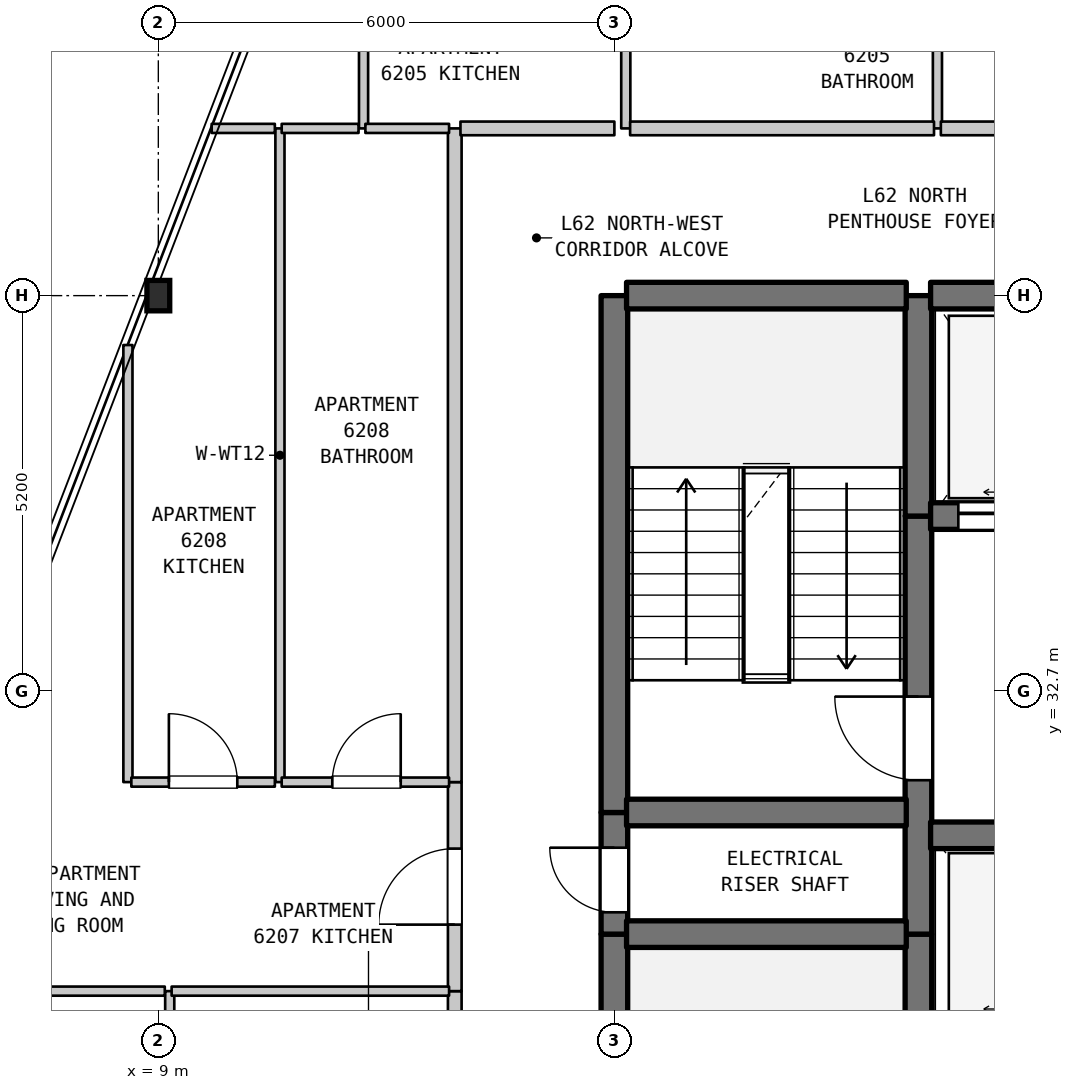
"""IFC4 building model, lengths in metres.
Left out: names, types, materials, properties, quantities, classifications, styles, units other than length and angle.
Written with IfcOpenShell. Run it as: python <this file> out.ifc"""

import sys

from ifc_helpers import new_model, si_unit, direction, frame, frame_2d, origin, origin_2d, place, context, subcontext, project, spatial, rectangle, i_section, extrude, element, fill, save


model = new_model("IFC4")
c1 = context("Model", 3, precision=1e-05, world=origin(), true_north=direction((0.0, 1.0)))
c2 = subcontext(c1, "Body", "Model", "MODEL_VIEW")
j1 = project(units=[si_unit("LENGTHUNIT", "METRE"), si_unit("PLANEANGLEUNIT", "RADIAN")], contexts=[c1])
p1 = place(None, origin())
s1 = spatial("IfcSite", under=j1, at=p1, CompositionType="ELEMENT")
p2 = place(p1, origin())
s2 = spatial("IfcBuilding", under=s1, at=p2, CompositionType="ELEMENT")
p3 = place(p2, frame((0.0, 0.0, 251.0)))
s3 = spatial("IfcBuildingStorey", under=s2, at=p3, CompositionType="ELEMENT", Elevation=251.0)
p4 = place(p3, frame((9.0, 37.9, 0.0), z_axis=(0.0, 0.0, 1.0), x_axis=(1.0, 0.0, 0.0)))
e1 = element("IfcColumn", 1, at=p4, inside=s3, PredefinedType="COLUMN", context=c2, shape_type="SweptSolid", body=[
    extrude(i_section(OverallWidth=0.3, OverallDepth=0.4, WebThickness=0.013, FlangeThickness=0.024, FilletRadius=0.027, at=origin_2d()), origin(), (0.0, 0.0, 1.0), 3.7),
])
p5 = place(p3, frame((8.6, 31.5, 0.0), z_axis=(0.0, 0.0, 1.0), x_axis=(0.0, 1.0, 0.0)))
e2 = element("IfcWall", 2, at=p5, inside=s3, PredefinedType="PARTITIONING", context=c2, shape_type="SweptSolid", body=[
    extrude(rectangle(XDim=5.75, YDim=0.12, at=frame_2d((2.875, 0.0))), origin(), (0.0, 0.0, 1.0), 3.39),
])
p6 = place(p3, frame((9.15, 28.4, 0.0), z_axis=(0.0, 0.0, 1.0), x_axis=(0.0, 1.0, 0.0)))
e3 = element("IfcWall", 3, at=p6, inside=s3, PredefinedType="PARTITIONING", context=c2, shape_type="SweptSolid", body=[
    extrude(rectangle(XDim=0.35, YDim=0.12, at=frame_2d((0.175, 0.0))), origin(), (0.0, 0.0, 1.0), 3.39),
])
p7 = place(p3, frame((10.6, 31.5, 0.0), z_axis=(0.0, 0.0, 1.0), x_axis=(0.0, 1.0, 0.0)))
e4 = element("IfcWall", 4, at=p7, inside=s3, PredefinedType="PARTITIONING", context=c2, shape_type="SweptSolid", body=[
    extrude(rectangle(XDim=8.6, YDim=0.12, at=frame_2d((4.3, 0.0))), origin(), (0.0, 0.0, 1.0), 3.39),
])
p8 = place(p3, frame((11.7, 40.1, 0.0), z_axis=(0.0, 0.0, 1.0), x_axis=(0.0, 1.0, 0.0)))
e5 = element("IfcWall", 5, at=p8, inside=s3, PredefinedType="PARTITIONING", context=c2, shape_type="SweptSolid", body=[
    extrude(rectangle(XDim=2.3, YDim=0.12, at=frame_2d((1.15, 0.0))), origin(), (0.0, 0.0, 1.0), 3.39),
])
p9 = place(p3, frame((12.9, 28.4, 0.0), z_axis=(0.0, 0.0, 1.0), x_axis=(0.0, 1.0, 0.0)))
e6 = element("IfcWall", 6, at=p9, inside=s3, PredefinedType="STANDARD", context=c2, shape_type="SweptSolid", body=[
    extrude(rectangle(XDim=0.35, YDim=0.18, at=frame_2d((0.175, 0.0))), origin(), (0.0, 0.0, 1.0), 3.39),
])
p10 = place(p3, frame((12.9, 28.75, 0.0), z_axis=(0.0, 0.0, 1.0), x_axis=(0.0, 1.0, 0.0)))
e7 = element("IfcWall", 7, at=p10, inside=s3, PredefinedType="STANDARD", context=c2, shape_type="SweptSolid", body=[
    extrude(rectangle(XDim=2.75, YDim=0.18, at=frame_2d((1.375, 0.0))), origin(), (0.0, 0.0, 1.0), 3.39),
])
p11 = place(p10, frame((0.875, 0.0, 0.0)))
e8 = element("IfcOpeningElement", 8, at=p11, cuts=e7, PredefinedType="OPENING", context=c2, shape_type="SweptSolid", body=[
    extrude(rectangle(XDim=1.0, YDim=2.15, at=frame_2d((0.5, 1.075))), frame((0.0, 0.1, 0.0), z_axis=(0.0, -1.0, 0.0), x_axis=(1.0, 0.0, 0.0)), (0.0, 0.0, 1.0), 0.2),
])
p12 = place(p3, frame((12.9, 31.5, 0.0), z_axis=(0.0, 0.0, 1.0), x_axis=(0.0, 1.0, 0.0)))
e9 = element("IfcWall", 9, at=p12, inside=s3, PredefinedType="STANDARD", context=c2, shape_type="SweptSolid", body=[
    extrude(rectangle(XDim=8.6, YDim=0.18, at=frame_2d((4.3, 0.0))), origin(), (0.0, 0.0, 1.0), 3.39),
])
p13 = place(p3, frame((15.0, 22.7, 0.0), z_axis=(0.0, 0.0, 1.0), x_axis=(0.0, 1.0, 0.0)))
e10 = element("IfcWall", 10, at=p13, inside=s3, PredefinedType="SHEAR", context=c2, shape_type="SweptSolid", body=[
    extrude(rectangle(XDim=6.8, YDim=0.35, at=frame_2d((3.4, 0.0))), origin(), (0.0, 0.0, 1.0), 3.39),
])
p14 = place(p3, frame((15.0, 29.5, 0.0), z_axis=(0.0, 0.0, 1.0), x_axis=(0.0, 1.0, 0.0)))
e11 = element("IfcWall", 11, at=p14, inside=s3, PredefinedType="SHEAR", context=c2, shape_type="SweptSolid", body=[
    extrude(rectangle(XDim=1.6, YDim=0.35, at=frame_2d((0.8, 0.0))), origin(), (0.0, 0.0, 1.0), 3.39),
])
p15 = place(p14, frame((0.287, 0.0, 0.0)))
e12 = element("IfcOpeningElement", 12, at=p15, cuts=e11, PredefinedType="OPENING", context=c2, shape_type="SweptSolid", body=[
    extrude(rectangle(XDim=0.85, YDim=2.1, at=frame_2d((0.425, 1.05))), frame((0.0, 0.185, 0.0), z_axis=(0.0, -1.0, 0.0), x_axis=(1.0, 0.0, 0.0)), (0.0, 0.0, 1.0), 0.37),
])
p16 = place(p3, frame((15.0, 31.1, 0.0), z_axis=(0.0, 0.0, 1.0), x_axis=(0.0, 1.0, 0.0)))
e13 = element("IfcWall", 13, at=p16, inside=s3, PredefinedType="SHEAR", context=c2, shape_type="SweptSolid", body=[
    extrude(rectangle(XDim=6.8, YDim=0.35, at=frame_2d((3.4, 0.0))), origin(), (0.0, 0.0, 1.0), 3.39),
])
p17 = place(p3, frame((15.15, 40.1, 0.0), z_axis=(0.0, 0.0, 1.0), x_axis=(0.0, 1.0, 0.0)))
e14 = element("IfcWall", 14, at=p17, inside=s3, PredefinedType="PARTITIONING", context=c2, shape_type="SweptSolid", body=[
    extrude(rectangle(XDim=2.3, YDim=0.12, at=frame_2d((1.15, 0.0))), origin(), (0.0, 0.0, 1.0), 3.39),
])
p18 = place(p3, frame((19.0, 28.2, 0.0), z_axis=(0.0, 0.0, 1.0), x_axis=(0.0, 1.0, 0.0)))
e15 = element("IfcWall", 15, at=p18, inside=s3, PredefinedType="SHEAR", context=c2, shape_type="SweptSolid", body=[
    extrude(rectangle(XDim=1.3, YDim=0.35, at=frame_2d((0.65, 0.0))), origin(), (0.0, 0.0, 1.0), 3.39),
])
p19 = place(p3, frame((19.0, 29.5, 0.0), z_axis=(0.0, 0.0, 1.0), x_axis=(0.0, 1.0, 0.0)))
e16 = element("IfcWall", 16, at=p19, inside=s3, PredefinedType="SHEAR", context=c2, shape_type="SweptSolid", body=[
    extrude(rectangle(XDim=5.5, YDim=0.35, at=frame_2d((2.75, 0.0))), origin(), (0.0, 0.0, 1.0), 3.39),
])
p20 = place(p19, frame((2.025, 0.0, 0.0)))
e17 = element("IfcOpeningElement", 17, at=p20, cuts=e16, PredefinedType="OPENING", context=c2, shape_type="SweptSolid", body=[
    extrude(rectangle(XDim=1.1, YDim=2.15, at=frame_2d((0.55, 1.075))), frame((0.0, 0.185, 0.0), z_axis=(0.0, -1.0, 0.0), x_axis=(1.0, 0.0, 0.0)), (0.0, 0.0, 1.0), 0.37),
])
p21 = place(p3, frame((19.0, 35.0, 0.0), z_axis=(0.0, 0.0, 1.0), x_axis=(0.0, 1.0, 0.0)))
e18 = element("IfcWall", 18, at=p21, inside=s3, PredefinedType="SHEAR", context=c2, shape_type="SweptSolid", body=[
    extrude(rectangle(XDim=2.9, YDim=0.35, at=frame_2d((1.45, 0.0))), origin(), (0.0, 0.0, 1.0), 3.39),
])
p22 = place(p3, frame((19.25, 40.1, 0.0), z_axis=(0.0, 0.0, 1.0), x_axis=(0.0, 1.0, 0.0)))
e19 = element("IfcWall", 19, at=p22, inside=s3, PredefinedType="PARTITIONING", context=c2, shape_type="SweptSolid", body=[
    extrude(rectangle(XDim=2.3, YDim=0.12, at=frame_2d((1.15, 0.0))), origin(), (0.0, 0.0, 1.0), 3.39),
])
p23 = place(p3, frame((5.337, 28.75, 0.0), z_axis=(0.0, 0.0, 1.0), x_axis=(1.0, 0.0, 0.0)))
e20 = element("IfcWall", 20, at=p23, inside=s3, PredefinedType="PARTITIONING", context=c2, shape_type="SweptSolid", body=[
    extrude(rectangle(XDim=3.748, YDim=0.12, at=frame_2d((1.874, 0.0))), origin(), (0.0, 0.0, 1.0), 3.39),
])
p24 = place(p3, frame((9.175, 28.75, 0.0), z_axis=(0.0, 0.0, 1.0), x_axis=(1.0, 0.0, 0.0)))
e21 = element("IfcWall", 21, at=p24, inside=s3, PredefinedType="PARTITIONING", context=c2, shape_type="SweptSolid", body=[
    extrude(rectangle(XDim=3.65, YDim=0.12, at=frame_2d((1.825, 0.0))), origin(), (0.0, 0.0, 1.0), 3.39),
])
p25 = place(p3, frame((15.16, 29.5, 0.0), z_axis=(0.0, 0.0, 1.0), x_axis=(1.0, 0.0, 0.0)))
e22 = element("IfcWall", 22, at=p25, inside=s3, PredefinedType="SHEAR", context=c2, shape_type="SweptSolid", body=[
    extrude(rectangle(XDim=3.68, YDim=0.35, at=frame_2d((1.84, 0.0))), origin(), (0.0, 0.0, 1.0), 3.39),
])
p26 = place(p3, frame((19.16, 30.8, 0.0), z_axis=(0.0, 0.0, 1.0), x_axis=(1.0, 0.0, 0.0)))
e23 = element("IfcWall", 23, at=p26, inside=s3, PredefinedType="SHEAR", context=c2, shape_type="SweptSolid", body=[
    extrude(rectangle(XDim=4.48, YDim=0.35, at=frame_2d((2.24, 0.0))), origin(), (0.0, 0.0, 1.0), 3.39),
])
p27 = place(p3, frame((15.16, 31.1, 0.0), z_axis=(0.0, 0.0, 1.0), x_axis=(1.0, 0.0, 0.0)))
e24 = element("IfcWall", 24, at=p27, inside=s3, PredefinedType="SHEAR", context=c2, shape_type="SweptSolid", body=[
    extrude(rectangle(XDim=3.68, YDim=0.35, at=frame_2d((1.84, 0.0))), origin(), (0.0, 0.0, 1.0), 3.39),
])
p28 = place(p3, frame((8.645, 31.5, 0.0), z_axis=(0.0, 0.0, 1.0), x_axis=(1.0, 0.0, 0.0)))
e25 = element("IfcWall", 25, at=p28, inside=s3, PredefinedType="PARTITIONING", context=c2, shape_type="SweptSolid", body=[
    extrude(rectangle(XDim=1.888, YDim=0.12, at=frame_2d((0.944, 0.0))), origin(), (0.0, 0.0, 1.0), 3.39),
])
p29 = place(p28, frame((0.494, 0.0, 0.0)))
e26 = element("IfcOpeningElement", 26, at=p29, cuts=e25, PredefinedType="OPENING", context=c2, shape_type="SweptSolid", body=[
    extrude(rectangle(XDim=0.9, YDim=2.15, at=frame_2d((0.45, 1.075))), frame((0.0, 0.07, 0.0), z_axis=(0.0, -1.0, 0.0), x_axis=(1.0, 0.0, 0.0)), (0.0, 0.0, 1.0), 0.14),
])
p30 = place(p3, frame((10.623, 31.5, 0.0), z_axis=(0.0, 0.0, 1.0), x_axis=(1.0, 0.0, 0.0)))
e27 = element("IfcWall", 27, at=p30, inside=s3, PredefinedType="PARTITIONING", context=c2, shape_type="SweptSolid", body=[
    extrude(rectangle(XDim=2.202, YDim=0.12, at=frame_2d((1.101, 0.0))), origin(), (0.0, 0.0, 1.0), 3.39),
])
p31 = place(p30, frame((0.666, 0.0, 0.0)))
e28 = element("IfcOpeningElement", 28, at=p31, cuts=e27, PredefinedType="OPENING", context=c2, shape_type="SweptSolid", body=[
    extrude(rectangle(XDim=0.9, YDim=2.1, at=frame_2d((0.45, 1.05))), frame((0.0, 0.07, 0.0), z_axis=(0.0, -1.0, 0.0), x_axis=(1.0, 0.0, 0.0)), (0.0, 0.0, 1.0), 0.14),
])
p32 = place(p3, frame((19.16, 35.0, 0.0), z_axis=(0.0, 0.0, 1.0), x_axis=(1.0, 0.0, 0.0)))
e29 = element("IfcWall", 29, at=p32, inside=s3, PredefinedType="SHEAR", context=c2, shape_type="SweptSolid", body=[
    extrude(rectangle(XDim=4.48, YDim=0.35, at=frame_2d((2.24, 0.0))), origin(), (0.0, 0.0, 1.0), 3.39),
])
p33 = place(p32, frame((0.365, 0.0, 0.0)))
e30 = element("IfcOpeningElement", 30, at=p33, cuts=e29, PredefinedType="OPENING", context=c2, shape_type="SweptSolid", body=[
    extrude(rectangle(XDim=1.35, YDim=2.2, at=frame_2d((0.675, 1.1))), frame((0.0, 0.185, 0.0), z_axis=(0.0, -1.0, 0.0), x_axis=(1.0, 0.0, 0.0)), (0.0, 0.0, 1.0), 0.37),
])
p34 = place(p32, frame((2.765, 0.0, 0.0)))
e31 = element("IfcOpeningElement", 31, at=p34, cuts=e29, PredefinedType="OPENING", context=c2, shape_type="SweptSolid", body=[
    extrude(rectangle(XDim=1.35, YDim=2.2, at=frame_2d((0.675, 1.1))), frame((0.0, 0.185, 0.0), z_axis=(0.0, -1.0, 0.0), x_axis=(1.0, 0.0, 0.0)), (0.0, 0.0, 1.0), 0.37),
])
p35 = place(p3, frame((15.16, 37.9, 0.0), z_axis=(0.0, 0.0, 1.0), x_axis=(1.0, 0.0, 0.0)))
e32 = element("IfcWall", 32, at=p35, inside=s3, PredefinedType="SHEAR", context=c2, shape_type="SweptSolid", body=[
    extrude(rectangle(XDim=3.68, YDim=0.35, at=frame_2d((1.84, 0.0))), origin(), (0.0, 0.0, 1.0), 3.39),
])
p36 = place(p3, frame((19.16, 37.9, 0.0), z_axis=(0.0, 0.0, 1.0), x_axis=(1.0, 0.0, 0.0)))
e33 = element("IfcWall", 33, at=p36, inside=s3, PredefinedType="SHEAR", context=c2, shape_type="SweptSolid", body=[
    extrude(rectangle(XDim=4.48, YDim=0.35, at=frame_2d((2.24, 0.0))), origin(), (0.0, 0.0, 1.0), 3.39),
])
p37 = place(p3, frame((9.702, 40.1, 0.0), z_axis=(0.0, 0.0, 1.0), x_axis=(1.0, 0.0, 0.0)))
e34 = element("IfcWall", 34, at=p37, inside=s3, PredefinedType="PARTITIONING", context=c2, shape_type="SweptSolid", body=[
    extrude(rectangle(XDim=0.831, YDim=0.12, at=frame_2d((0.416, 0.0))), origin(), (0.0, 0.0, 1.0), 3.39),
])
p38 = place(p3, frame((10.623, 40.1, 0.0), z_axis=(0.0, 0.0, 1.0), x_axis=(1.0, 0.0, 0.0)))
e35 = element("IfcWall", 35, at=p38, inside=s3, PredefinedType="PARTITIONING", context=c2, shape_type="SweptSolid", body=[
    extrude(rectangle(XDim=1.011, YDim=0.12, at=frame_2d((0.505, 0.0))), origin(), (0.0, 0.0, 1.0), 3.39),
])
p39 = place(p3, frame((11.724, 40.1, 0.0), z_axis=(0.0, 0.0, 1.0), x_axis=(1.0, 0.0, 0.0)))
e36 = element("IfcWall", 36, at=p39, inside=s3, PredefinedType="PARTITIONING", context=c2, shape_type="SweptSolid", body=[
    extrude(rectangle(XDim=1.101, YDim=0.12, at=frame_2d((0.55, 0.0))), origin(), (0.0, 0.0, 1.0), 3.39),
])
p40 = place(p3, frame((12.975, 40.1, 0.0), z_axis=(0.0, 0.0, 1.0), x_axis=(1.0, 0.0, 0.0)))
e37 = element("IfcWall", 37, at=p40, inside=s3, PredefinedType="STANDARD", context=c2, shape_type="SweptSolid", body=[
    extrude(rectangle(XDim=2.025, YDim=0.18, at=frame_2d((1.012, 0.0))), origin(), (0.0, 0.0, 1.0), 3.39),
])
p41 = place(p3, frame((15.207, 40.1, 0.0), z_axis=(0.0, 0.0, 1.0), x_axis=(1.0, 0.0, 0.0)))
e38 = element("IfcWall", 38, at=p41, inside=s3, PredefinedType="STANDARD", context=c2, shape_type="SweptSolid", body=[
    extrude(rectangle(XDim=3.998, YDim=0.18, at=frame_2d((1.999, 0.0))), origin(), (0.0, 0.0, 1.0), 3.39),
])
p42 = place(p3, frame((19.295, 40.1, 0.0), z_axis=(0.0, 0.0, 1.0), x_axis=(1.0, 0.0, 0.0)))
e39 = element("IfcWall", 39, at=p42, inside=s3, PredefinedType="STANDARD", context=c2, shape_type="SweptSolid", body=[
    extrude(rectangle(XDim=10.345, YDim=0.18, at=frame_2d((5.172, 0.0))), origin(), (0.0, 0.0, 1.0), 3.39),
])
p43 = place(p42, frame((2.035, 0.0, 0.0)))
e40 = element("IfcOpeningElement", 40, at=p43, cuts=e39, PredefinedType="OPENING", context=c2, shape_type="SweptSolid", body=[
    extrude(rectangle(XDim=1.0, YDim=2.15, at=frame_2d((0.5, 1.075))), frame((0.0, 0.1, 0.0), z_axis=(0.0, -1.0, 0.0), x_axis=(1.0, 0.0, 0.0)), (0.0, 0.0, 1.0), 0.2),
])
p44 = place(p42, frame((7.235, 0.0, 0.0)))
e41 = element("IfcOpeningElement", 41, at=p44, cuts=e39, PredefinedType="OPENING", context=c2, shape_type="SweptSolid", body=[
    extrude(rectangle(XDim=1.0, YDim=2.15, at=frame_2d((0.5, 1.075))), frame((0.0, 0.1, 0.0), z_axis=(0.0, -1.0, 0.0), x_axis=(1.0, 0.0, 0.0)), (0.0, 0.0, 1.0), 0.2),
])
p45 = place(p11, origin())
e42 = element("IfcDoor", 42, at=p45, inside=s3, OperationType="SINGLE_SWING_LEFT", PredefinedType="DOOR", context=c2, shape_type="SweptSolid", body=[
    extrude(rectangle(XDim=1.0, YDim=2.15, at=frame_2d((0.5, 1.075))), frame((0.0, 0.025, 0.0), z_axis=(0.0, -1.0, 0.0), x_axis=(1.0, 0.0, 0.0)), (0.0, 0.0, 1.0), 0.05),
])
fill(e8, e42)
p46 = place(p15, origin())
e43 = element("IfcDoor", 43, at=p46, inside=s3, OperationType="SINGLE_SWING_RIGHT", PredefinedType="DOOR", context=c2, shape_type="SweptSolid", body=[
    extrude(rectangle(XDim=0.85, YDim=2.1, at=frame_2d((0.425, 1.05))), frame((0.0, 0.025, 0.0), z_axis=(0.0, -1.0, 0.0), x_axis=(1.0, 0.0, 0.0)), (0.0, 0.0, 1.0), 0.05),
])
fill(e12, e43)
p47 = place(p20, origin())
e44 = element("IfcDoor", 44, at=p47, inside=s3, OperationType="SINGLE_SWING_RIGHT", PredefinedType="DOOR", context=c2, shape_type="SweptSolid", body=[
    extrude(rectangle(XDim=1.1, YDim=2.15, at=frame_2d((0.55, 1.075))), frame((0.0, 0.025, 0.0), z_axis=(0.0, -1.0, 0.0), x_axis=(1.0, 0.0, 0.0)), (0.0, 0.0, 1.0), 0.05),
])
fill(e17, e44)
p48 = place(p29, origin())
e45 = element("IfcDoor", 45, at=p48, inside=s3, OperationType="SINGLE_SWING_LEFT", PredefinedType="DOOR", context=c2, shape_type="SweptSolid", body=[
    extrude(rectangle(XDim=0.9, YDim=2.15, at=frame_2d((0.45, 1.075))), frame((0.0, 0.025, 0.0), z_axis=(0.0, -1.0, 0.0), x_axis=(1.0, 0.0, 0.0)), (0.0, 0.0, 1.0), 0.05),
])
fill(e26, e45)
p49 = place(p31, origin())
e46 = element("IfcDoor", 46, at=p49, inside=s3, OperationType="SINGLE_SWING_RIGHT", PredefinedType="DOOR", context=c2, shape_type="SweptSolid", body=[
    extrude(rectangle(XDim=0.9, YDim=2.1, at=frame_2d((0.45, 1.05))), frame((0.0, 0.025, 0.0), z_axis=(0.0, -1.0, 0.0), x_axis=(1.0, 0.0, 0.0)), (0.0, 0.0, 1.0), 0.05),
])
fill(e28, e46)
p50 = place(p33, origin())
e47 = element("IfcDoor", 47, at=p50, inside=s3, OperationType="DOUBLE_DOOR_SLIDING", PredefinedType="DOOR", context=c2, shape_type="SweptSolid", body=[
    extrude(rectangle(XDim=1.35, YDim=2.2, at=frame_2d((0.675, 1.1))), frame((0.0, 0.025, 0.0), z_axis=(0.0, -1.0, 0.0), x_axis=(1.0, 0.0, 0.0)), (0.0, 0.0, 1.0), 0.05),
])
fill(e30, e47)
save(model, sys.argv[1])
